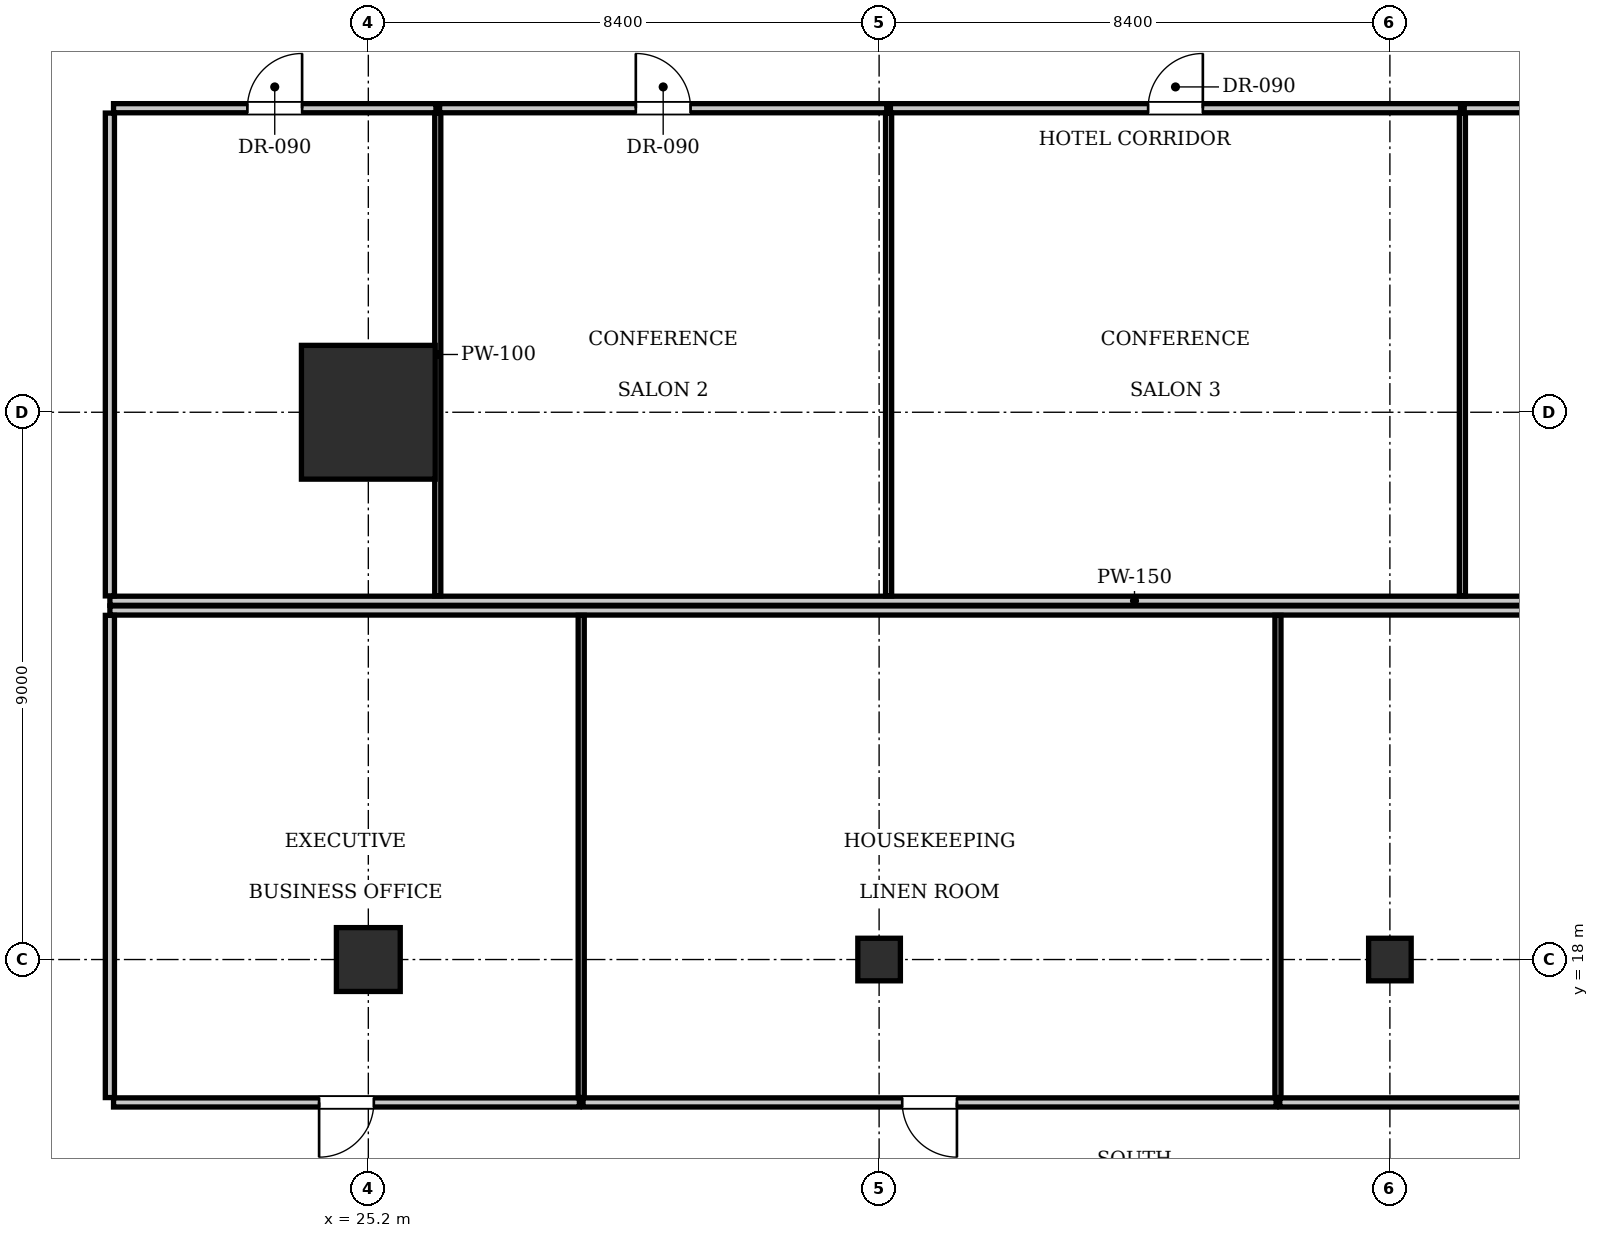
"""IFC4 building model, lengths in metres.
Left out: names, types, materials, properties, quantities, classifications, styles, units other than length and angle.
Written with IfcOpenShell. Run it as: python <this file> out.ifc"""

import sys

from ifc_helpers import new_model, si_unit, direction, frame, frame_2d, origin, origin_2d, place, context, subcontext, project, spatial, rectangle, i_section, extrude, element, fill, save


model = new_model("IFC4")
c1 = context("Model", 3, precision=1e-05, world=origin(), true_north=direction((0.0, 1.0)))
c2 = subcontext(c1, "Body", "Model", "MODEL_VIEW")
j1 = project(units=[si_unit("LENGTHUNIT", "METRE"), si_unit("PLANEANGLEUNIT", "RADIAN")], contexts=[c1])
p1 = place(None, origin())
s1 = spatial("IfcSite", under=j1, at=p1, CompositionType="ELEMENT")
p2 = place(p1, origin())
s2 = spatial("IfcBuilding", under=s1, at=p2, CompositionType="ELEMENT")
p3 = place(p2, frame((0.0, 0.0, 61.6)))
s3 = spatial("IfcBuildingStorey", under=s2, at=p3, CompositionType="ELEMENT", Elevation=61.6)
p4 = place(p3, frame((25.2, 27.0, 0.0), z_axis=(0.0, 0.0, 1.0), x_axis=(1.0, 0.0, 0.0)))
e1 = element("IfcColumn", 1, at=p4, inside=s3, PredefinedType="COLUMN", context=c2, shape_type="SweptSolid", body=[
    extrude(rectangle(XDim=2.2, YDim=2.2, at=origin_2d()), origin(), (0.0, 0.0, 1.0), 3.85),
])
p5 = place(p3, frame((25.2, 18.0, 0.0), z_axis=(0.0, 0.0, 1.0), x_axis=(1.0, 0.0, 0.0)))
e2 = element("IfcColumn", 2, at=p5, inside=s3, PredefinedType="COLUMN", context=c2, shape_type="SweptSolid", body=[
    extrude(rectangle(XDim=1.05, YDim=1.05, at=origin_2d()), origin(), (0.0, 0.0, 1.0), 3.85),
])
for number, where, z_axis, x_axis in (
    (3, (33.6, 18.0, 0.0), (0.0, 0.0, 1.0), (1.0, 0.0, 0.0)),
    (4, (42.0, 18.0, 0.0), (0.0, 0.0, 1.0), (1.0, 0.0, 0.0)),
):
    element("IfcColumn", number, at=place(p3, frame(where, z_axis=z_axis, x_axis=x_axis)), inside=s3, PredefinedType="COLUMN", context=c2, shape_type="SweptSolid", body=[
        extrude(i_section(OverallWidth=0.7, OverallDepth=0.7, WebThickness=0.028, FlangeThickness=0.044, at=origin_2d()), origin(), (0.0, 0.0, 1.0), 3.85),
    ])
p6 = place(p3, frame((20.95, 23.9, 0.0), z_axis=(0.0, 0.0, 1.0), x_axis=(1.0, 0.0, 0.0)))
e5 = element("IfcWall", 5, at=p6, inside=s3, PredefinedType="PARTITIONING", context=c2, shape_type="SweptSolid", body=[
    extrude(rectangle(XDim=33.7, YDim=0.15, at=frame_2d((16.85, 0.0))), origin(), (0.0, 0.0, 1.0), 3.61),
])
p7 = place(p3, frame((20.95, 23.98, 0.0), z_axis=(0.0, 0.0, 1.0), x_axis=(0.0, 1.0, 0.0)))
e6 = element("IfcWall", 6, at=p7, inside=s3, PredefinedType="PARTITIONING", context=c2, shape_type="SweptSolid", body=[
    extrude(rectangle(XDim=7.94, YDim=0.15, at=frame_2d((3.97, 0.0))), origin(), (0.0, 0.0, 1.0), 3.255),
])
p8 = place(p3, frame((21.01, 32.0, 0.0), z_axis=(0.0, 0.0, 1.0), x_axis=(1.0, 0.0, 0.0)))
e7 = element("IfcWall", 7, at=p8, inside=s3, PredefinedType="PARTITIONING", context=c2, shape_type="SweptSolid", body=[
    extrude(rectangle(XDim=5.302, YDim=0.15, at=frame_2d((2.651, 0.0))), origin(), (0.0, 0.0, 1.0), 3.61),
])
p9 = place(p8, frame((2.201, 0.0, 0.0)))
e8 = element("IfcOpeningElement", 8, at=p9, cuts=e7, PredefinedType="OPENING", context=c2, shape_type="SweptSolid", body=[
    extrude(rectangle(XDim=0.9, YDim=2.1, at=frame_2d((0.45, 1.05))), frame((0.0, 0.085, 0.0), z_axis=(0.0, -1.0, 0.0), x_axis=(1.0, 0.0, 0.0)), (0.0, 0.0, 1.0), 0.17),
])
p10 = place(p3, frame((26.342, 23.98, 0.0), z_axis=(0.0, 0.0, 1.0), x_axis=(0.0, 1.0, 0.0)))
e9 = element("IfcWall", 9, at=p10, inside=s3, PredefinedType="PARTITIONING", context=c2, shape_type="SweptSolid", body=[
    extrude(rectangle(XDim=7.94, YDim=0.1, at=frame_2d((3.97, 0.0))), origin(), (0.0, 0.0, 1.0), 3.61),
])
p11 = place(p3, frame((26.372, 32.0, 0.0), z_axis=(0.0, 0.0, 1.0), x_axis=(1.0, 0.0, 0.0)))
e10 = element("IfcWall", 10, at=p11, inside=s3, PredefinedType="PARTITIONING", context=c2, shape_type="SweptSolid", body=[
    extrude(rectangle(XDim=7.354, YDim=0.15, at=frame_2d((3.677, 0.0))), origin(), (0.0, 0.0, 1.0), 3.61),
])
p12 = place(p11, frame((3.227, 0.0, 0.0)))
e11 = element("IfcOpeningElement", 11, at=p12, cuts=e10, PredefinedType="OPENING", context=c2, shape_type="SweptSolid", body=[
    extrude(rectangle(XDim=0.9, YDim=2.1, at=frame_2d((0.45, 1.05))), frame((0.0, 0.085, 0.0), z_axis=(0.0, -1.0, 0.0), x_axis=(1.0, 0.0, 0.0)), (0.0, 0.0, 1.0), 0.17),
])
p13 = place(p3, frame((33.756, 23.98, 0.0), z_axis=(0.0, 0.0, 1.0), x_axis=(0.0, 1.0, 0.0)))
e12 = element("IfcWall", 12, at=p13, inside=s3, PredefinedType="PARTITIONING", context=c2, shape_type="SweptSolid", body=[
    extrude(rectangle(XDim=7.94, YDim=0.1, at=frame_2d((3.97, 0.0))), origin(), (0.0, 0.0, 1.0), 2.988),
])
p14 = place(p3, frame((33.786, 32.0, 0.0), z_axis=(0.0, 0.0, 1.0), x_axis=(1.0, 0.0, 0.0)))
e13 = element("IfcWall", 13, at=p14, inside=s3, PredefinedType="PARTITIONING", context=c2, shape_type="SweptSolid", body=[
    extrude(rectangle(XDim=9.376, YDim=0.15, at=frame_2d((4.688, 0.0))), origin(), (0.0, 0.0, 1.0), 3.61),
])
p15 = place(p14, frame((4.238, 0.0, 0.0)))
e14 = element("IfcOpeningElement", 14, at=p15, cuts=e13, PredefinedType="OPENING", context=c2, shape_type="SweptSolid", body=[
    extrude(rectangle(XDim=0.9, YDim=2.1, at=frame_2d((0.45, 1.05))), frame((0.0, 0.085, 0.0), z_axis=(0.0, -1.0, 0.0), x_axis=(1.0, 0.0, 0.0)), (0.0, 0.0, 1.0), 0.17),
])
p16 = place(p3, frame((43.192, 23.98, 0.0), z_axis=(0.0, 0.0, 1.0), x_axis=(0.0, 1.0, 0.0)))
e15 = element("IfcWall", 15, at=p16, inside=s3, PredefinedType="PARTITIONING", context=c2, shape_type="SweptSolid", body=[
    extrude(rectangle(XDim=7.94, YDim=0.1, at=frame_2d((3.97, 0.0))), origin(), (0.0, 0.0, 1.0), 3.61),
])
p17 = place(p3, frame((43.222, 32.0, 0.0), z_axis=(0.0, 0.0, 1.0), x_axis=(1.0, 0.0, 0.0)))
e16 = element("IfcWall", 16, at=p17, inside=s3, PredefinedType="PARTITIONING", context=c2, shape_type="SweptSolid", body=[
    extrude(rectangle(XDim=11.368, YDim=0.15, at=frame_2d((5.684, 0.0))), origin(), (0.0, 0.0, 1.0), 3.61),
])
p18 = place(p17, frame((5.234, 0.0, 0.0)))
e17 = element("IfcOpeningElement", 17, at=p18, cuts=e16, PredefinedType="OPENING", context=c2, shape_type="SweptSolid", body=[
    extrude(rectangle(XDim=0.9, YDim=2.1, at=frame_2d((0.45, 1.05))), frame((0.0, 0.085, 0.0), z_axis=(0.0, -1.0, 0.0), x_axis=(1.0, 0.0, 0.0)), (0.0, 0.0, 1.0), 0.17),
])
p19 = place(p3, frame((20.95, 23.74, 0.0), z_axis=(0.0, 0.0, 1.0), x_axis=(1.0, 0.0, 0.0)))
e18 = element("IfcWall", 18, at=p19, inside=s3, PredefinedType="PARTITIONING", context=c2, shape_type="SweptSolid", body=[
    extrude(rectangle(XDim=33.7, YDim=0.15, at=frame_2d((16.85, 0.0))), origin(), (0.0, 0.0, 1.0), 3.61),
])
p20 = place(p3, frame((20.95, 15.73, 0.0), z_axis=(0.0, 0.0, 1.0), x_axis=(0.0, 1.0, 0.0)))
e19 = element("IfcWall", 19, at=p20, inside=s3, PredefinedType="PARTITIONING", context=c2, shape_type="SweptSolid", body=[
    extrude(rectangle(XDim=7.93, YDim=0.15, at=frame_2d((3.965, 0.0))), origin(), (0.0, 0.0, 1.0), 3.255),
])
p21 = place(p3, frame((21.01, 15.65, 0.0), z_axis=(0.0, 0.0, 1.0), x_axis=(1.0, 0.0, 0.0)))
e20 = element("IfcWall", 20, at=p21, inside=s3, PredefinedType="PARTITIONING", context=c2, shape_type="SweptSolid", body=[
    extrude(rectangle(XDim=7.661, YDim=0.15, at=frame_2d((3.831, 0.0))), origin(), (0.0, 0.0, 1.0), 3.61),
])
p22 = place(p21, frame((3.381, 0.0, 0.0)))
e21 = element("IfcOpeningElement", 21, at=p22, cuts=e20, PredefinedType="OPENING", context=c2, shape_type="SweptSolid", body=[
    extrude(rectangle(XDim=0.9, YDim=2.1, at=frame_2d((0.45, 1.05))), frame((0.0, 0.085, 0.0), z_axis=(0.0, -1.0, 0.0), x_axis=(1.0, 0.0, 0.0)), (0.0, 0.0, 1.0), 0.17),
])
p23 = place(p3, frame((28.701, 15.73, 0.0), z_axis=(0.0, 0.0, 1.0), x_axis=(0.0, 1.0, 0.0)))
e22 = element("IfcWall", 22, at=p23, inside=s3, PredefinedType="PARTITIONING", context=c2, shape_type="SweptSolid", body=[
    extrude(rectangle(XDim=7.93, YDim=0.1, at=frame_2d((3.965, 0.0))), origin(), (0.0, 0.0, 1.0), 3.61),
])
p24 = place(p3, frame((28.731, 15.65, 0.0), z_axis=(0.0, 0.0, 1.0), x_axis=(1.0, 0.0, 0.0)))
e23 = element("IfcWall", 23, at=p24, inside=s3, PredefinedType="PARTITIONING", context=c2, shape_type="SweptSolid", body=[
    extrude(rectangle(XDim=11.398, YDim=0.15, at=frame_2d((5.699, 0.0))), origin(), (0.0, 0.0, 1.0), 3.61),
])
p25 = place(p24, frame((5.249, 0.0, 0.0)))
e24 = element("IfcOpeningElement", 24, at=p25, cuts=e23, PredefinedType="OPENING", context=c2, shape_type="SweptSolid", body=[
    extrude(rectangle(XDim=0.9, YDim=2.1, at=frame_2d((0.45, 1.05))), frame((0.0, 0.085, 0.0), z_axis=(0.0, -1.0, 0.0), x_axis=(1.0, 0.0, 0.0)), (0.0, 0.0, 1.0), 0.17),
])
p26 = place(p3, frame((40.159, 15.73, 0.0), z_axis=(0.0, 0.0, 1.0), x_axis=(0.0, 1.0, 0.0)))
e25 = element("IfcWall", 25, at=p26, inside=s3, PredefinedType="PARTITIONING", context=c2, shape_type="SweptSolid", body=[
    extrude(rectangle(XDim=7.93, YDim=0.1, at=frame_2d((3.965, 0.0))), origin(), (0.0, 0.0, 1.0), 3.61),
])
p27 = place(p3, frame((40.189, 15.65, 0.0), z_axis=(0.0, 0.0, 1.0), x_axis=(1.0, 0.0, 0.0)))
e26 = element("IfcWall", 26, at=p27, inside=s3, PredefinedType="PARTITIONING", context=c2, shape_type="SweptSolid", body=[
    extrude(rectangle(XDim=14.401, YDim=0.15, at=frame_2d((7.201, 0.0))), origin(), (0.0, 0.0, 1.0), 3.61),
])
p28 = place(p27, frame((6.75, 0.0, 0.0)))
e27 = element("IfcOpeningElement", 27, at=p28, cuts=e26, PredefinedType="OPENING", context=c2, shape_type="SweptSolid", body=[
    extrude(rectangle(XDim=0.9, YDim=2.1, at=frame_2d((0.45, 1.05))), frame((0.0, 0.085, 0.0), z_axis=(0.0, -1.0, 0.0), x_axis=(1.0, 0.0, 0.0)), (0.0, 0.0, 1.0), 0.17),
])
p29 = place(p9, origin())
e28 = element("IfcDoor", 28, at=p29, inside=s3, OperationType="SINGLE_SWING_RIGHT", PredefinedType="DOOR", context=c2, shape_type="SweptSolid", body=[
    extrude(rectangle(XDim=0.9, YDim=2.1, at=frame_2d((0.45, 1.05))), frame((0.0, 0.025, 0.0), z_axis=(0.0, -1.0, 0.0), x_axis=(1.0, 0.0, 0.0)), (0.0, 0.0, 1.0), 0.05),
])
fill(e8, e28)
p30 = place(p12, origin())
e29 = element("IfcDoor", 29, at=p30, inside=s3, OperationType="SINGLE_SWING_LEFT", PredefinedType="DOOR", context=c2, shape_type="SweptSolid", body=[
    extrude(rectangle(XDim=0.9, YDim=2.1, at=frame_2d((0.45, 1.05))), frame((0.0, 0.025, 0.0), z_axis=(0.0, -1.0, 0.0), x_axis=(1.0, 0.0, 0.0)), (0.0, 0.0, 1.0), 0.05),
])
fill(e11, e29)
p31 = place(p15, origin())
e30 = element("IfcDoor", 30, at=p31, inside=s3, OperationType="SINGLE_SWING_RIGHT", PredefinedType="DOOR", context=c2, shape_type="SweptSolid", body=[
    extrude(rectangle(XDim=0.9, YDim=2.1, at=frame_2d((0.45, 1.05))), frame((0.0, 0.025, 0.0), z_axis=(0.0, -1.0, 0.0), x_axis=(1.0, 0.0, 0.0)), (0.0, 0.0, 1.0), 0.05),
])
fill(e14, e30)
p32 = place(p22, frame((0.9, 0.0, 0.0), z_axis=(0.0, 0.0, 1.0), x_axis=(-1.0, 0.0, 0.0)))
e31 = element("IfcDoor", 31, at=p32, inside=s3, OperationType="SINGLE_SWING_RIGHT", PredefinedType="DOOR", context=c2, shape_type="SweptSolid", body=[
    extrude(rectangle(XDim=0.9, YDim=2.1, at=frame_2d((0.45, 1.05))), frame((0.0, 0.025, 0.0), z_axis=(0.0, -1.0, 0.0), x_axis=(1.0, 0.0, 0.0)), (0.0, 0.0, 1.0), 0.05),
])
fill(e21, e31)
p33 = place(p25, frame((0.9, 0.0, 0.0), z_axis=(0.0, 0.0, 1.0), x_axis=(-1.0, 0.0, 0.0)))
e32 = element("IfcDoor", 32, at=p33, inside=s3, OperationType="SINGLE_SWING_LEFT", PredefinedType="DOOR", context=c2, shape_type="SweptSolid", body=[
    extrude(rectangle(XDim=0.9, YDim=2.1, at=frame_2d((0.45, 1.05))), frame((0.0, 0.025, 0.0), z_axis=(0.0, -1.0, 0.0), x_axis=(1.0, 0.0, 0.0)), (0.0, 0.0, 1.0), 0.05),
])
fill(e24, e32)
save(model, sys.argv[1])
